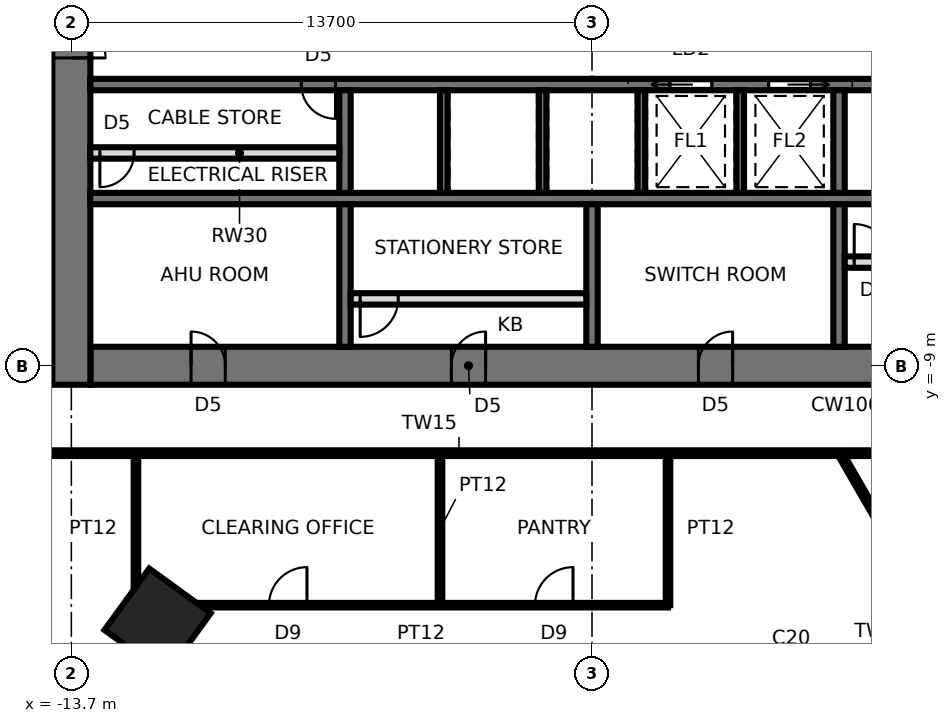
"""IFC4 building model, lengths in metres.
Left out: names, types, materials, properties, quantities, classifications, styles, units other than length and angle.
Written with IfcOpenShell. Run it as: python <this file> out.ifc"""

import sys

from ifc_helpers import new_model, si_unit, direction, frame, frame_2d, origin, origin_2d, place, context, subcontext, project, spatial, rectangle, extrude, element, fill, save


model = new_model("IFC4")
c1 = context("Model", 3, precision=1e-05, world=origin(), true_north=direction((0.0, 1.0)))
c2 = subcontext(c1, "Body", "Model", "MODEL_VIEW")
j1 = project(units=[si_unit("LENGTHUNIT", "METRE"), si_unit("PLANEANGLEUNIT", "RADIAN")], contexts=[c1])
p1 = place(None, origin())
s1 = spatial("IfcSite", under=j1, at=p1, CompositionType="ELEMENT")
p2 = place(p1, origin())
s2 = spatial("IfcBuilding", under=s1, at=p2, CompositionType="ELEMENT")
p3 = place(p2, frame((0.0, 0.0, 78.4)))
s3 = spatial("IfcBuildingStorey", under=s2, at=p3, CompositionType="ELEMENT", Elevation=78.4)
p4 = place(p3, frame((-11.43, -15.733, 0.0), z_axis=(0.0, 0.0, 1.0), x_axis=(-0.587785252292, -0.809016994375, 0.0)))
e1 = element("IfcColumn", 1, at=p4, inside=s3, PredefinedType="COLUMN", context=c2, shape_type="SweptSolid", body=[
    extrude(rectangle(XDim=2.0, YDim=2.0, at=origin_2d()), origin(), (0.0, 0.0, 1.0), 4.2),
])
p5 = place(p3, frame((-13.2, -9.0, 0.0), z_axis=(0.0, 0.0, 1.0), x_axis=(1.0, 0.0, 0.0)))
e2 = element("IfcWall", 2, at=p5, inside=s3, PredefinedType="SHEAR", context=c2, shape_type="SweptSolid", body=[
    extrude(rectangle(XDim=26.4, YDim=1.0, at=frame_2d((13.2, 0.0))), origin(), (0.0, 0.0, 1.0), 4.2),
])
p6 = place(p5, frame((2.65, 0.0, 0.0)))
e3 = element("IfcOpeningElement", 3, at=p6, cuts=e2, PredefinedType="OPENING", context=c2, shape_type="SweptSolid", body=[
    extrude(rectangle(XDim=0.9, YDim=2.1, at=frame_2d((0.45, 1.05))), frame((0.0, 0.51, 0.0), z_axis=(0.0, -1.0, 0.0), x_axis=(1.0, 0.0, 0.0)), (0.0, 0.0, 1.0), 1.02),
])
p7 = place(p5, frame((9.5, 0.0, 0.0)))
e4 = element("IfcOpeningElement", 4, at=p7, cuts=e2, PredefinedType="OPENING", context=c2, shape_type="SweptSolid", body=[
    extrude(rectangle(XDim=0.9, YDim=2.1, at=frame_2d((0.45, 1.05))), frame((0.0, 0.51, 0.0), z_axis=(0.0, -1.0, 0.0), x_axis=(1.0, 0.0, 0.0)), (0.0, 0.0, 1.0), 1.02),
])
p8 = place(p5, frame((16.0, 0.0, 0.0)))
e5 = element("IfcOpeningElement", 5, at=p8, cuts=e2, PredefinedType="OPENING", context=c2, shape_type="SweptSolid", body=[
    extrude(rectangle(XDim=0.9, YDim=2.1, at=frame_2d((0.45, 1.05))), frame((0.0, 0.51, 0.0), z_axis=(0.0, -1.0, 0.0), x_axis=(1.0, 0.0, 0.0)), (0.0, 0.0, 1.0), 1.02),
])
p9 = place(p5, frame((22.85, 0.0, 0.0)))
e6 = element("IfcOpeningElement", 6, at=p9, cuts=e2, PredefinedType="OPENING", context=c2, shape_type="SweptSolid", body=[
    extrude(rectangle(XDim=0.9, YDim=2.1, at=frame_2d((0.45, 1.05))), frame((0.0, 0.51, 0.0), z_axis=(0.0, -1.0, 0.0), x_axis=(1.0, 0.0, 0.0)), (0.0, 0.0, 1.0), 1.02),
])
p10 = place(p3, frame((-13.7, 9.5, 0.0), z_axis=(0.0, 0.0, 1.0), x_axis=(0.0, -1.0, 0.0)))
e7 = element("IfcWall", 7, at=p10, inside=s3, PredefinedType="SHEAR", context=c2, shape_type="SweptSolid", body=[
    extrude(rectangle(XDim=19.0, YDim=1.0, at=frame_2d((9.5, 0.0))), origin(), (0.0, 0.0, 1.0), 4.2),
])
p11 = place(p10, frame((8.6, 0.0, 0.0)))
e8 = element("IfcOpeningElement", 8, at=p11, cuts=e7, PredefinedType="OPENING", context=c2, shape_type="SweptSolid", body=[
    extrude(rectangle(XDim=1.8, YDim=2.4, at=frame_2d((0.9, 1.2))), frame((0.0, 0.51, 0.0), z_axis=(0.0, -1.0, 0.0), x_axis=(1.0, 0.0, 0.0)), (0.0, 0.0, 1.0), 1.02),
])
p12 = place(p3, frame((-13.2, -1.6, 0.0), z_axis=(0.0, 0.0, 1.0), x_axis=(1.0, 0.0, 0.0)))
e9 = element("IfcWall", 9, at=p12, inside=s3, PredefinedType="SHEAR", context=c2, shape_type="SweptSolid", body=[
    extrude(rectangle(XDim=26.4, YDim=0.3, at=frame_2d((13.2, 0.0))), origin(), (0.0, 0.0, 1.0), 4.2),
])
p13 = place(p12, frame((25.15, 0.0, 0.0)))
e10 = element("IfcOpeningElement", 10, at=p13, cuts=e9, PredefinedType="OPENING", context=c2, shape_type="SweptSolid", body=[
    extrude(rectangle(XDim=1.0, YDim=2.1, at=frame_2d((0.5, 1.05))), frame((0.0, 0.16, 0.0), z_axis=(0.0, -1.0, 0.0), x_axis=(1.0, 0.0, 0.0)), (0.0, 0.0, 1.0), 0.32),
])
p14 = place(p12, frame((15.25, 0.0, 0.0)))
e11 = element("IfcOpeningElement", 11, at=p14, cuts=e9, PredefinedType="OPENING", context=c2, shape_type="SweptSolid", body=[
    extrude(rectangle(XDim=1.1, YDim=2.3, at=frame_2d((0.55, 1.15))), frame((0.0, 0.16, 0.0), z_axis=(0.0, -1.0, 0.0), x_axis=(1.0, 0.0, 0.0)), (0.0, 0.0, 1.0), 0.32),
])
p15 = place(p12, frame((17.85, 0.0, 0.0)))
e12 = element("IfcOpeningElement", 12, at=p15, cuts=e9, PredefinedType="OPENING", context=c2, shape_type="SweptSolid", body=[
    extrude(rectangle(XDim=1.1, YDim=2.3, at=frame_2d((0.55, 1.15))), frame((0.0, 0.16, 0.0), z_axis=(0.0, -1.0, 0.0), x_axis=(1.0, 0.0, 0.0)), (0.0, 0.0, 1.0), 0.32),
])
p16 = place(p12, frame((5.55, 0.0, 0.0)))
e13 = element("IfcOpeningElement", 13, at=p16, cuts=e9, PredefinedType="OPENING", context=c2, shape_type="SweptSolid", body=[
    extrude(rectangle(XDim=0.9, YDim=2.1, at=frame_2d((0.45, 1.05))), frame((0.0, 0.16, 0.0), z_axis=(0.0, -1.0, 0.0), x_axis=(1.0, 0.0, 0.0)), (0.0, 0.0, 1.0), 0.32),
])
p17 = place(p3, frame((-13.2, -4.6, 0.0), z_axis=(0.0, 0.0, 1.0), x_axis=(1.0, 0.0, 0.0)))
e14 = element("IfcWall", 14, at=p17, inside=s3, PredefinedType="SHEAR", context=c2, shape_type="SweptSolid", body=[
    extrude(rectangle(XDim=26.4, YDim=0.3, at=frame_2d((13.2, 0.0))), origin(), (0.0, 0.0, 1.0), 4.2),
])
p18 = place(p3, frame((-6.5, -1.75, 0.0), z_axis=(0.0, 0.0, 1.0), x_axis=(0.0, -1.0, 0.0)))
e15 = element("IfcWall", 15, at=p18, inside=s3, PredefinedType="SHEAR", context=c2, shape_type="SweptSolid", body=[
    extrude(rectangle(XDim=2.7, YDim=0.3, at=frame_2d((1.35, 0.0))), origin(), (0.0, 0.0, 1.0), 4.2),
])
p19 = place(p3, frame((-6.5, -4.75, 0.0), z_axis=(0.0, 0.0, 1.0), x_axis=(0.0, -1.0, 0.0)))
e16 = element("IfcWall", 16, at=p19, inside=s3, PredefinedType="SHEAR", context=c2, shape_type="SweptSolid", body=[
    extrude(rectangle(XDim=3.75, YDim=0.3, at=frame_2d((1.875, 0.0))), origin(), (0.0, 0.0, 1.0), 4.2),
])
p20 = place(p3, frame((6.5, -1.75, 0.0), z_axis=(0.0, 0.0, 1.0), x_axis=(0.0, -1.0, 0.0)))
e17 = element("IfcWall", 17, at=p20, inside=s3, PredefinedType="SHEAR", context=c2, shape_type="SweptSolid", body=[
    extrude(rectangle(XDim=2.7, YDim=0.3, at=frame_2d((1.35, 0.0))), origin(), (0.0, 0.0, 1.0), 4.2),
])
p21 = place(p3, frame((6.5, -4.75, 0.0), z_axis=(0.0, 0.0, 1.0), x_axis=(0.0, -1.0, 0.0)))
e18 = element("IfcWall", 18, at=p21, inside=s3, PredefinedType="SHEAR", context=c2, shape_type="SweptSolid", body=[
    extrude(rectangle(XDim=3.75, YDim=0.3, at=frame_2d((1.875, 0.0))), origin(), (0.0, 0.0, 1.0), 4.2),
])
for number, where, z_axis, x_axis in (
    (19, (-3.9, -1.75, 0.0), (0.0, 0.0, 1.0), (0.0, -1.0, 0.0)),
    (20, (-1.3, -1.75, 0.0), (0.0, 0.0, 1.0), (0.0, -1.0, 0.0)),
    (21, (1.3, -1.75, 0.0), (0.0, 0.0, 1.0), (0.0, -1.0, 0.0)),
    (22, (3.9, -1.75, 0.0), (0.0, 0.0, 1.0), (0.0, -1.0, 0.0)),
):
    element("IfcWall", number, at=place(p3, frame(where, z_axis=z_axis, x_axis=x_axis)), inside=s3, PredefinedType="SHEAR", context=c2, shape_type="SweptSolid", body=[
        extrude(rectangle(XDim=2.7, YDim=0.2, at=frame_2d((1.35, 0.0))), origin(), (0.0, 0.0, 1.0), 4.2),
    ])
p22 = place(p3, frame((0.0, -4.75, 0.0), z_axis=(0.0, 0.0, 1.0), x_axis=(0.0, -1.0, 0.0)))
e23 = element("IfcWall", 23, at=p22, inside=s3, PredefinedType="SHEAR", context=c2, shape_type="SweptSolid", body=[
    extrude(rectangle(XDim=3.75, YDim=0.3, at=frame_2d((1.875, 0.0))), origin(), (0.0, 0.0, 1.0), 4.2),
])
p23 = place(p3, frame((-6.35, -7.24, 0.0), z_axis=(0.0, 0.0, 1.0), x_axis=(1.0, 0.0, 0.0)))
e24 = element("IfcWall", 24, at=p23, inside=s3, PredefinedType="PARTITIONING", context=c2, shape_type="SweptSolid", body=[
    extrude(rectangle(XDim=6.2, YDim=0.3, at=frame_2d((3.1, 0.0))), origin(), (0.0, 0.0, 1.0), 4.04),
])
p24 = place(p23, frame((0.25, 0.0, 0.0)))
e25 = element("IfcOpeningElement", 25, at=p24, cuts=e24, PredefinedType="OPENING", context=c2, shape_type="SweptSolid", body=[
    extrude(rectangle(XDim=1.0, YDim=2.4, at=frame_2d((0.5, 1.2))), frame((0.0, 0.16, 0.0), z_axis=(0.0, -1.0, 0.0), x_axis=(1.0, 0.0, 0.0)), (0.0, 0.0, 1.0), 0.32),
])
p25 = place(p3, frame((6.65, -6.272, 0.0), z_axis=(0.0, 0.0, 1.0), x_axis=(1.0, 0.0, 0.0)))
e26 = element("IfcWall", 26, at=p25, inside=s3, PredefinedType="PARTITIONING", context=c2, shape_type="SweptSolid", body=[
    extrude(rectangle(XDim=6.55, YDim=0.3, at=frame_2d((3.275, 0.0))), origin(), (0.0, 0.0, 1.0), 4.04),
])
p26 = place(p25, frame((0.25, 0.0, 0.0)))
e27 = element("IfcOpeningElement", 27, at=p26, cuts=e26, PredefinedType="OPENING", context=c2, shape_type="SweptSolid", body=[
    extrude(rectangle(XDim=1.0, YDim=2.4, at=frame_2d((0.5, 1.2))), frame((0.0, 0.16, 0.0), z_axis=(0.0, -1.0, 0.0), x_axis=(1.0, 0.0, 0.0)), (0.0, 0.0, 1.0), 0.32),
])
p27 = place(p3, frame((-13.2, -3.4, 0.0), z_axis=(0.0, 0.0, 1.0), x_axis=(1.0, 0.0, 0.0)))
e28 = element("IfcWall", 28, at=p27, inside=s3, PredefinedType="SOLIDWALL", context=c2, shape_type="SweptSolid", body=[
    extrude(rectangle(XDim=6.55, YDim=0.3, at=frame_2d((3.275, 0.0))), origin(), (0.0, 0.0, 1.0), 4.04),
])
p28 = place(p27, frame((0.25, 0.0, 0.0)))
e29 = element("IfcOpeningElement", 29, at=p28, cuts=e28, PredefinedType="OPENING", context=c2, shape_type="SweptSolid", body=[
    extrude(rectangle(XDim=0.9, YDim=2.1, at=frame_2d((0.45, 1.05))), frame((0.0, 0.16, 0.0), z_axis=(0.0, -1.0, 0.0), x_axis=(1.0, 0.0, 0.0)), (0.0, 0.0, 1.0), 0.32),
])
p29 = place(p3, frame((-12.0, -11.3, 0.0), z_axis=(0.0, 0.0, 1.0), x_axis=(0.0, -1.0, 0.0)))
e30 = element("IfcWall", 30, at=p29, inside=s3, PredefinedType="PARTITIONING", context=c2, shape_type="SweptSolid", body=[
    extrude(rectangle(XDim=4.0, YDim=0.12, at=frame_2d((2.0, 0.0))), origin(), (0.0, 0.0, 1.0), 4.04),
])
p30 = place(p3, frame((-12.0, -15.3, 0.0), z_axis=(0.0, 0.0, 1.0), x_axis=(1.0, 0.0, 0.0)))
e31 = element("IfcWall", 31, at=p30, inside=s3, PredefinedType="PARTITIONING", context=c2, shape_type="SweptSolid", body=[
    extrude(rectangle(XDim=14.0, YDim=0.12, at=frame_2d((7.0, 0.0))), origin(), (0.0, 0.0, 1.0), 3.586),
])
p31 = place(p30, frame((3.5, 0.0, 0.0)))
e32 = element("IfcOpeningElement", 32, at=p31, cuts=e31, PredefinedType="OPENING", context=c2, shape_type="SweptSolid", body=[
    extrude(rectangle(XDim=1.0, YDim=2.4, at=frame_2d((0.5, 1.2))), frame((0.0, 0.07, 0.0), z_axis=(0.0, -1.0, 0.0), x_axis=(1.0, 0.0, 0.0)), (0.0, 0.0, 1.0), 0.14),
])
p32 = place(p30, frame((10.5, 0.0, 0.0)))
e33 = element("IfcOpeningElement", 33, at=p32, cuts=e31, PredefinedType="OPENING", context=c2, shape_type="SweptSolid", body=[
    extrude(rectangle(XDim=1.0, YDim=2.4, at=frame_2d((0.5, 1.2))), frame((0.0, 0.07, 0.0), z_axis=(0.0, -1.0, 0.0), x_axis=(1.0, 0.0, 0.0)), (0.0, 0.0, 1.0), 0.14),
])
p33 = place(p3, frame((-16.0, -11.3, 0.0), z_axis=(0.0, 0.0, 1.0), x_axis=(1.0, 0.0, 0.0)))
e34 = element("IfcWall", 34, at=p33, inside=s3, PredefinedType="PARTITIONING", context=c2, shape_type="SweptSolid", body=[
    extrude(rectangle(XDim=25.0, YDim=0.15, at=frame_2d((12.5, 0.0))), origin(), (0.0, 0.0, 1.0), 4.04),
])
for number, where, z_axis, x_axis in (
    (35, (-4.0, -11.3, 0.0), (0.0, 0.0, 1.0), (0.0, -1.0, 0.0)),
    (36, (2.0, -15.3, 0.0), (0.0, 0.0, 1.0), (0.0, 1.0, 0.0)),
):
    element("IfcWall", number, at=place(p3, frame(where, z_axis=z_axis, x_axis=x_axis)), inside=s3, PredefinedType="PARTITIONING", context=c2, shape_type="SweptSolid", body=[
        extrude(rectangle(XDim=4.0, YDim=0.12, at=frame_2d((2.0, 0.0))), origin(), (0.0, 0.0, 1.0), 4.04),
    ])
p34 = place(p3, frame((11.949, -20.697, 0.0), z_axis=(0.0, 0.0, 1.0), x_axis=(-0.499989292232, 0.866031585829, 0.0)))
e37 = element("IfcWall", 37, at=p34, inside=s3, PredefinedType="PARTITIONING", context=c2, shape_type="SweptSolid", body=[
    extrude(rectangle(XDim=10.85, YDim=0.15, at=frame_2d((5.425, 0.0))), origin(), (0.0, 0.0, 1.0), 4.04),
])
p35 = place(p11, origin())
e38 = element("IfcDoor", 38, at=p35, inside=s3, OperationType="DOUBLE_DOOR_SINGLE_SWING", PredefinedType="DOOR", context=c2, shape_type="SweptSolid", body=[
    extrude(rectangle(XDim=1.72, YDim=2.36, at=frame_2d((0.9, 1.18))), frame((0.0, 0.025, 0.0), z_axis=(0.0, -1.0, 0.0), x_axis=(1.0, 0.0, 0.0)), (0.0, 0.0, 1.0), 0.05),
    extrude(rectangle(XDim=0.04, YDim=2.4, at=frame_2d((0.02, 1.2))), frame((0.0, 0.25, 0.0), z_axis=(0.0, -1.0, 0.0), x_axis=(1.0, 0.0, 0.0)), (0.0, 0.0, 1.0), 0.5),
    extrude(rectangle(XDim=0.04, YDim=2.4, at=frame_2d((1.78, 1.2))), frame((0.0, 0.25, 0.0), z_axis=(0.0, -1.0, 0.0), x_axis=(1.0, 0.0, 0.0)), (0.0, 0.0, 1.0), 0.5),
    extrude(rectangle(XDim=1.72, YDim=0.04, at=frame_2d((0.9, 2.38))), frame((0.0, 0.25, 0.0), z_axis=(0.0, -1.0, 0.0), x_axis=(1.0, 0.0, 0.0)), (0.0, 0.0, 1.0), 0.5),
])
fill(e8, e38)
p36 = place(p14, frame((1.1, 0.0, 0.0), z_axis=(0.0, 0.0, 1.0), x_axis=(-1.0, 0.0, 0.0)))
e39 = element("IfcDoor", 39, at=p36, inside=s3, OperationType="SLIDING_TO_RIGHT", PredefinedType="DOOR", context=c2, shape_type="SweptSolid", body=[
    extrude(rectangle(XDim=1.1, YDim=2.3, at=frame_2d((0.55, 1.15))), frame((0.0, 0.025, 0.0), z_axis=(0.0, -1.0, 0.0), x_axis=(1.0, 0.0, 0.0)), (0.0, 0.0, 1.0), 0.05),
])
fill(e11, e39)
p37 = place(p15, frame((1.1, 0.0, 0.0), z_axis=(0.0, 0.0, 1.0), x_axis=(-1.0, 0.0, 0.0)))
e40 = element("IfcDoor", 40, at=p37, inside=s3, OperationType="SLIDING_TO_LEFT", PredefinedType="DOOR", context=c2, shape_type="SweptSolid", body=[
    extrude(rectangle(XDim=1.1, YDim=2.3, at=frame_2d((0.55, 1.15))), frame((0.0, 0.025, 0.0), z_axis=(0.0, -1.0, 0.0), x_axis=(1.0, 0.0, 0.0)), (0.0, 0.0, 1.0), 0.05),
])
fill(e12, e40)
p38 = place(p16, frame((0.9, 0.0, 0.0), z_axis=(0.0, 0.0, 1.0), x_axis=(-1.0, 0.0, 0.0)))
e41 = element("IfcDoor", 41, at=p38, inside=s3, OperationType="SINGLE_SWING_LEFT", PredefinedType="DOOR", context=c2, shape_type="SweptSolid", body=[
    extrude(rectangle(XDim=0.9, YDim=2.1, at=frame_2d((0.45, 1.05))), frame((0.0, 0.025, 0.0), z_axis=(0.0, -1.0, 0.0), x_axis=(1.0, 0.0, 0.0)), (0.0, 0.0, 1.0), 0.05),
])
fill(e13, e41)
p39 = place(p6, origin())
e42 = element("IfcDoor", 42, at=p39, inside=s3, OperationType="SINGLE_SWING_LEFT", PredefinedType="DOOR", context=c2, shape_type="SweptSolid", body=[
    extrude(rectangle(XDim=0.82, YDim=2.06, at=frame_2d((0.45, 1.03))), frame((0.0, 0.025, 0.0), z_axis=(0.0, -1.0, 0.0), x_axis=(1.0, 0.0, 0.0)), (0.0, 0.0, 1.0), 0.05),
    extrude(rectangle(XDim=0.04, YDim=2.1, at=frame_2d((0.02, 1.05))), frame((0.0, 0.25, 0.0), z_axis=(0.0, -1.0, 0.0), x_axis=(1.0, 0.0, 0.0)), (0.0, 0.0, 1.0), 0.5),
    extrude(rectangle(XDim=0.04, YDim=2.1, at=frame_2d((0.88, 1.05))), frame((0.0, 0.25, 0.0), z_axis=(0.0, -1.0, 0.0), x_axis=(1.0, 0.0, 0.0)), (0.0, 0.0, 1.0), 0.5),
    extrude(rectangle(XDim=0.82, YDim=0.04, at=frame_2d((0.45, 2.08))), frame((0.0, 0.25, 0.0), z_axis=(0.0, -1.0, 0.0), x_axis=(1.0, 0.0, 0.0)), (0.0, 0.0, 1.0), 0.5),
])
fill(e3, e42)
p40 = place(p7, origin())
e43 = element("IfcDoor", 43, at=p40, inside=s3, OperationType="SINGLE_SWING_RIGHT", PredefinedType="DOOR", context=c2, shape_type="SweptSolid", body=[
    extrude(rectangle(XDim=0.82, YDim=2.06, at=frame_2d((0.45, 1.03))), frame((0.0, 0.025, 0.0), z_axis=(0.0, -1.0, 0.0), x_axis=(1.0, 0.0, 0.0)), (0.0, 0.0, 1.0), 0.05),
    extrude(rectangle(XDim=0.04, YDim=2.1, at=frame_2d((0.02, 1.05))), frame((0.0, 0.25, 0.0), z_axis=(0.0, -1.0, 0.0), x_axis=(1.0, 0.0, 0.0)), (0.0, 0.0, 1.0), 0.5),
    extrude(rectangle(XDim=0.04, YDim=2.1, at=frame_2d((0.88, 1.05))), frame((0.0, 0.25, 0.0), z_axis=(0.0, -1.0, 0.0), x_axis=(1.0, 0.0, 0.0)), (0.0, 0.0, 1.0), 0.5),
    extrude(rectangle(XDim=0.82, YDim=0.04, at=frame_2d((0.45, 2.08))), frame((0.0, 0.25, 0.0), z_axis=(0.0, -1.0, 0.0), x_axis=(1.0, 0.0, 0.0)), (0.0, 0.0, 1.0), 0.5),
])
fill(e4, e43)
p41 = place(p8, origin())
e44 = element("IfcDoor", 44, at=p41, inside=s3, OperationType="SINGLE_SWING_RIGHT", PredefinedType="DOOR", context=c2, shape_type="SweptSolid", body=[
    extrude(rectangle(XDim=0.82, YDim=2.06, at=frame_2d((0.45, 1.03))), frame((0.0, 0.025, 0.0), z_axis=(0.0, -1.0, 0.0), x_axis=(1.0, 0.0, 0.0)), (0.0, 0.0, 1.0), 0.05),
    extrude(rectangle(XDim=0.04, YDim=2.1, at=frame_2d((0.02, 1.05))), frame((0.0, 0.25, 0.0), z_axis=(0.0, -1.0, 0.0), x_axis=(1.0, 0.0, 0.0)), (0.0, 0.0, 1.0), 0.5),
    extrude(rectangle(XDim=0.04, YDim=2.1, at=frame_2d((0.88, 1.05))), frame((0.0, 0.25, 0.0), z_axis=(0.0, -1.0, 0.0), x_axis=(1.0, 0.0, 0.0)), (0.0, 0.0, 1.0), 0.5),
    extrude(rectangle(XDim=0.82, YDim=0.04, at=frame_2d((0.45, 2.08))), frame((0.0, 0.25, 0.0), z_axis=(0.0, -1.0, 0.0), x_axis=(1.0, 0.0, 0.0)), (0.0, 0.0, 1.0), 0.5),
])
fill(e5, e44)
p42 = place(p24, frame((1.0, 0.0, 0.0), z_axis=(0.0, 0.0, 1.0), x_axis=(-1.0, 0.0, 0.0)))
e45 = element("IfcDoor", 45, at=p42, inside=s3, OperationType="SINGLE_SWING_RIGHT", PredefinedType="DOOR", context=c2, shape_type="SweptSolid", body=[
    extrude(rectangle(XDim=1.0, YDim=2.4, at=frame_2d((0.5, 1.2))), frame((0.0, 0.025, 0.0), z_axis=(0.0, -1.0, 0.0), x_axis=(1.0, 0.0, 0.0)), (0.0, 0.0, 1.0), 0.05),
])
fill(e25, e45)
p43 = place(p26, origin())
e46 = element("IfcDoor", 46, at=p43, inside=s3, OperationType="SINGLE_SWING_LEFT", PredefinedType="DOOR", context=c2, shape_type="SweptSolid", body=[
    extrude(rectangle(XDim=1.0, YDim=2.4, at=frame_2d((0.5, 1.2))), frame((0.0, 0.025, 0.0), z_axis=(0.0, -1.0, 0.0), x_axis=(1.0, 0.0, 0.0)), (0.0, 0.0, 1.0), 0.05),
])
fill(e27, e46)
p44 = place(p28, frame((0.9, 0.0, 0.0), z_axis=(0.0, 0.0, 1.0), x_axis=(-1.0, 0.0, 0.0)))
e47 = element("IfcDoor", 47, at=p44, inside=s3, OperationType="SINGLE_SWING_RIGHT", PredefinedType="DOOR", context=c2, shape_type="SweptSolid", body=[
    extrude(rectangle(XDim=0.9, YDim=2.1, at=frame_2d((0.45, 1.05))), frame((0.0, 0.025, 0.0), z_axis=(0.0, -1.0, 0.0), x_axis=(1.0, 0.0, 0.0)), (0.0, 0.0, 1.0), 0.05),
])
fill(e29, e47)
p45 = place(p31, origin())
e48 = element("IfcDoor", 48, at=p45, inside=s3, OperationType="SINGLE_SWING_RIGHT", PredefinedType="DOOR", context=c2, shape_type="SweptSolid", body=[
    extrude(rectangle(XDim=1.0, YDim=2.4, at=frame_2d((0.5, 1.2))), frame((0.0, 0.025, 0.0), z_axis=(0.0, -1.0, 0.0), x_axis=(1.0, 0.0, 0.0)), (0.0, 0.0, 1.0), 0.05),
])
fill(e32, e48)
p46 = place(p32, origin())
e49 = element("IfcDoor", 49, at=p46, inside=s3, OperationType="SINGLE_SWING_RIGHT", PredefinedType="DOOR", context=c2, shape_type="SweptSolid", body=[
    extrude(rectangle(XDim=1.0, YDim=2.4, at=frame_2d((0.5, 1.2))), frame((0.0, 0.025, 0.0), z_axis=(0.0, -1.0, 0.0), x_axis=(1.0, 0.0, 0.0)), (0.0, 0.0, 1.0), 0.05),
])
fill(e33, e49)
save(model, sys.argv[1])
